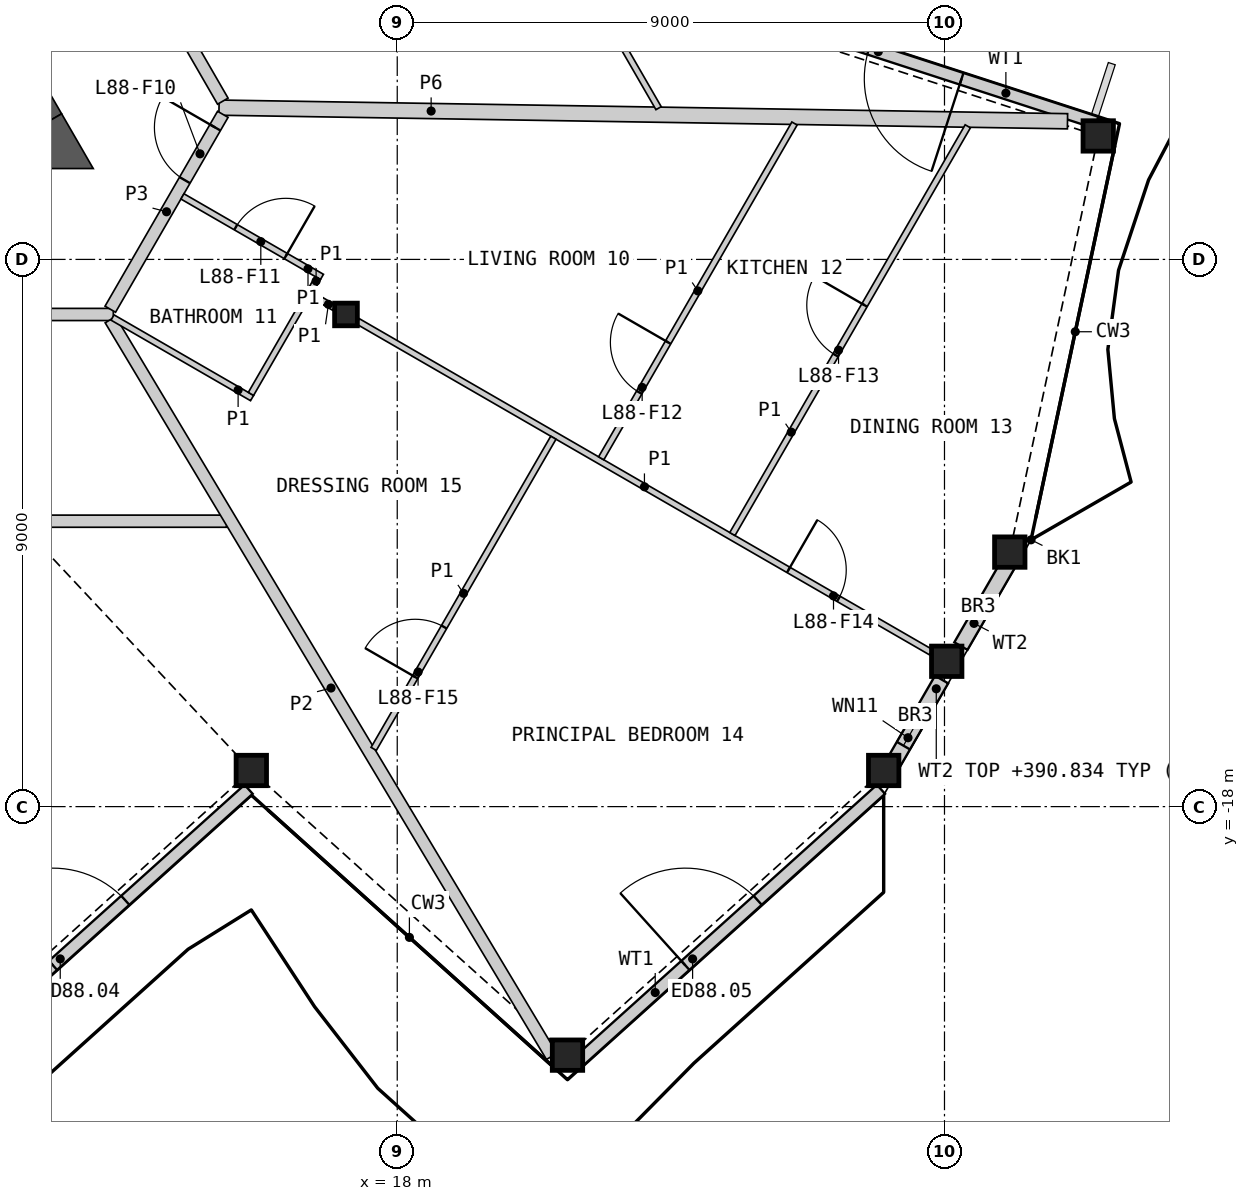
"""IFC4 building model, lengths in metres.
Left out: names, types, materials, properties, quantities, classifications, styles, units other than length and angle.
Written with IfcOpenShell. Run it as: python <this file> out.ifc"""

import sys

from ifc_helpers import new_model, si_unit, direction, frame, frame_2d, origin, origin_2d, place, context, subcontext, project, spatial, polyline, rectangle, hollow_rectangle, i_section, outline, extrude, element, fill, save


model = new_model("IFC4")
c1 = context("Model", 3, precision=1e-05, world=origin(), true_north=direction((0.0, 1.0)))
c2 = subcontext(c1, "Body", "Model", "MODEL_VIEW")
j1 = project(units=[si_unit("LENGTHUNIT", "METRE"), si_unit("PLANEANGLEUNIT", "RADIAN")], contexts=[c1])
p1 = place(None, origin())
s1 = spatial("IfcSite", under=j1, at=p1, CompositionType="ELEMENT")
p2 = place(p1, origin())
s2 = spatial("IfcBuilding", under=s1, at=p2, CompositionType="ELEMENT")
p3 = place(p2, frame((0.0, 0.0, 388.2)))
s3 = spatial("IfcBuildingStorey", under=s2, at=p3, CompositionType="ELEMENT", Elevation=388.2)
for number, where, z_axis, x_axis in (
    (1, (15.6, -17.406, 0.0), (0.0, 0.0, 1.0), (1.0, 0.0, 0.0)),
    (2, (20.8, -22.088, 0.0), (0.0, 0.0, 1.0), (1.0, 0.0, 0.0)),
    (3, (26.0, -17.406, 0.0), (0.0, 0.0, 1.0), (1.0, 0.0, 0.0)),
    (4, (27.037, -15.61, 0.0), (0.0, 0.0, 1.0), (1.0, 0.0, 0.0)),
    (5, (28.074, -13.814, 0.0), (0.0, 0.0, 1.0), (1.0, 0.0, 0.0)),
    (6, (29.529, -6.969, 0.0), (0.0, 0.0, 1.0), (1.0, 0.0, 0.0)),
):
    element("IfcColumn", number, at=place(p3, frame(where, z_axis=z_axis, x_axis=x_axis)), inside=s3, PredefinedType="COLUMN", context=c2, shape_type="SweptSolid", body=[
        extrude(hollow_rectangle(XDim=0.5, YDim=0.5, WallThickness=0.03, at=origin_2d()), origin(), (0.0, 0.0, 1.0), 3.4),
    ])
p4 = place(p3, frame((17.157, -9.906, 0.0), z_axis=(0.0, 0.0, 1.0), x_axis=(1.0, 0.0, 0.0)))
e7 = element("IfcColumn", 7, at=p4, inside=s3, PredefinedType="COLUMN", context=c2, shape_type="SweptSolid", body=[
    extrude(i_section(OverallWidth=0.374, OverallDepth=0.372, WebThickness=0.016, FlangeThickness=0.026, at=origin_2d()), origin(), (0.0, 0.0, 1.0), 3.4),
])
p5 = place(p3, frame((10.605, -22.173, 0.0), z_axis=(0.0, 0.0, 1.0), x_axis=(0.743135582201, 0.669140871915, 0.0)))
e8 = element("IfcWall", 8, at=p5, inside=s3, PredefinedType="SOLIDWALL", context=c2, shape_type="SweptSolid", body=[
    extrude(rectangle(XDim=6.662, YDim=0.2, at=frame_2d((3.331, 0.0))), origin(), (0.0, 0.0, 1.0), 2.634),
])
p6 = place(p5, frame((2.333, 0.0, 0.0)))
e9 = element("IfcOpeningElement", 9, at=p6, cuts=e8, PredefinedType="OPENING", context=c2, shape_type="SweptSolid", body=[
    extrude(rectangle(XDim=1.6, YDim=2.25, at=frame_2d((0.8, 1.125))), frame((0.0, 0.11, 0.0), z_axis=(0.0, -1.0, 0.0), x_axis=(1.0, 0.0, 0.0)), (0.0, 0.0, 1.0), 0.22),
])
p7 = place(p3, frame((21.005, -22.173, 0.0), z_axis=(0.0, 0.0, 1.0), x_axis=(0.743135582201, 0.669140871915, 0.0)))
e10 = element("IfcWall", 10, at=p7, inside=s3, PredefinedType="SOLIDWALL", context=c2, shape_type="SweptSolid", body=[
    extrude(rectangle(XDim=6.662, YDim=0.2, at=frame_2d((3.331, 0.0))), origin(), (0.0, 0.0, 1.0), 2.634),
])
p8 = place(p7, frame((2.333, 0.0, 0.0)))
e11 = element("IfcOpeningElement", 11, at=p8, cuts=e10, PredefinedType="OPENING", context=c2, shape_type="SweptSolid", body=[
    extrude(rectangle(XDim=1.6, YDim=2.25, at=frame_2d((0.8, 1.125))), frame((0.0, 0.11, 0.0), z_axis=(0.0, -1.0, 0.0), x_axis=(1.0, 0.0, 0.0)), (0.0, 0.0, 1.0), 0.22),
])
p9 = place(p3, frame((26.075, -17.43, 0.0), z_axis=(0.0, 0.0, 1.0), x_axis=(0.500027377864, 0.86600959659, 0.0)))
e12 = element("IfcWall", 12, at=p9, inside=s3, PredefinedType="SOLIDWALL", context=c2, shape_type="SweptSolid", body=[
    extrude(rectangle(XDim=1.756, YDim=0.25, at=frame_2d((0.878, 0.0))), origin(), (0.0, 0.0, 1.0), 2.634),
])
p10 = place(p9, frame((0.5, 0.0, 1.7)))
e13 = element("IfcOpeningElement", 13, at=p10, cuts=e12, PredefinedType="OPENING", context=c2, shape_type="SweptSolid", body=[
    extrude(rectangle(XDim=0.6, YDim=0.7, at=frame_2d((0.3, 0.35))), frame((0.0, 0.135, 0.0), z_axis=(0.0, -1.0, 0.0), x_axis=(1.0, 0.0, 0.0)), (0.0, 0.0, 1.0), 0.27),
])
p11 = place(p3, frame((27.27, -15.36, 0.0), z_axis=(0.0, 0.0, 1.0), x_axis=(0.499975693202, 0.866039436866, 0.0)))
e14 = element("IfcWall", 14, at=p11, inside=s3, PredefinedType="SOLIDWALL", context=c2, shape_type="SweptSolid", body=[
    extrude(rectangle(XDim=1.725, YDim=0.25, at=frame_2d((0.862, 0.0))), origin(), (0.0, 0.0, 1.0), 2.634),
])
p12 = place(p3, frame((29.5, -6.75, 0.0), z_axis=(0.0, 0.0, 1.0), x_axis=(-0.951060123915, 0.309005891041, 0.0)))
e15 = element("IfcWall", 15, at=p12, inside=s3, PredefinedType="SOLIDWALL", context=c2, shape_type="SweptSolid", body=[
    extrude(rectangle(XDim=6.265, YDim=0.2, at=frame_2d((3.133, 0.0))), origin(), (0.0, 0.0, 1.0), 2.634),
])
p13 = place(p12, frame((2.333, 0.0, 0.0)))
e16 = element("IfcOpeningElement", 16, at=p13, cuts=e15, PredefinedType="OPENING", context=c2, shape_type="SweptSolid", body=[
    extrude(rectangle(XDim=1.6, YDim=2.25, at=frame_2d((0.8, 1.125))), frame((0.0, 0.11, 0.0), z_axis=(0.0, -1.0, 0.0), x_axis=(1.0, 0.0, 0.0)), (0.0, 0.0, 1.0), 0.22),
])
p14 = place(p3, frame((12.221, -6.756, 0.0), z_axis=(0.0, 0.0, 1.0), x_axis=(-0.500020646047, 0.866013483456, 0.0)))
e17 = element("IfcWall", 17, at=p14, inside=s3, PredefinedType="SHEAR", context=c2, shape_type="SweptSolid", body=[
    extrude(rectangle(XDim=4.559, YDim=0.6, at=frame_2d((2.28, 0.0))), origin(), (0.0, 0.0, 1.0), 3.1),
])
p15 = place(p3, origin())
e18 = element("IfcWall", 18, at=p15, inside=s3, PredefinedType="SHEAR", context=c2, shape_type="SweptSolid", body=[
    extrude(outline(polyline([(11.961, -7.506), (11.961, -6.906), (12.48, -6.606), (13.0, -7.506), (11.961, -7.506)])), origin(), (0.0, 0.0, 1.0), 3.1),
])
p16 = place(p3, frame((15.069, -6.503, 0.0), z_axis=(0.0, 0.0, 1.0), x_axis=(0.999870484296, -0.016093931549, 0.0)))
e19 = element("IfcWall", 19, at=p16, inside=s3, PredefinedType="PARTITIONING", context=c2, shape_type="SweptSolid", body=[
    extrude(rectangle(XDim=13.956, YDim=0.25, at=frame_2d((6.978, 0.0))), origin(), (0.0, 0.0, 1.0), 2.33),
])
p17 = place(p3, frame((8.775, -9.906, 0.0), z_axis=(0.0, 0.0, 1.0), x_axis=(1.0, 0.0, 0.0)))
e20 = element("IfcWall", 20, at=p17, inside=s3, PredefinedType="PARTITIONING", context=c2, shape_type="SweptSolid", body=[
    extrude(rectangle(XDim=4.555, YDim=0.2, at=frame_2d((2.278, 0.0))), origin(), (0.0, 0.0, 1.0), 3.1),
])
p18 = place(p3, frame((12.981, -2.673, 0.0), z_axis=(0.0, 0.0, 1.0), x_axis=(0.499986217557, -0.866033360935, 0.0)))
e21 = element("IfcWall", 21, at=p18, inside=s3, PredefinedType="PARTITIONING", context=c2, shape_type="SweptSolid", body=[
    extrude(rectangle(XDim=4.3, YDim=0.2, at=frame_2d((2.15, 0.0))), origin(), (0.0, 0.0, 1.0), 3.1),
])
p19 = place(p3, frame((13.281, -9.819, 0.0), z_axis=(0.0, 0.0, 1.0), x_axis=(0.499948957823, 0.866054870994, 0.0)))
e22 = element("IfcWall", 22, at=p19, inside=s3, PredefinedType="PARTITIONING", context=c2, shape_type="SweptSolid", body=[
    extrude(rectangle(XDim=3.701, YDim=0.2, at=frame_2d((1.851, 0.0))), origin(), (0.0, 0.0, 1.0), 3.1),
])
p20 = place(p19, frame((2.451, 0.0, 0.0)))
e23 = element("IfcOpeningElement", 23, at=p20, cuts=e22, PredefinedType="OPENING", context=c2, shape_type="SweptSolid", body=[
    extrude(rectangle(XDim=1.0, YDim=2.1, at=frame_2d((0.5, 1.05))), frame((0.0, 0.11, 0.0), z_axis=(0.0, -1.0, 0.0), x_axis=(1.0, 0.0, 0.0)), (0.0, 0.0, 1.0), 0.22),
])
p21 = place(p3, frame((0.1, -13.306, 0.0), z_axis=(0.0, 0.0, 1.0), x_axis=(1.0, 0.0, 0.0)))
e24 = element("IfcWall", 24, at=p21, inside=s3, PredefinedType="PARTITIONING", context=c2, shape_type="SweptSolid", body=[
    extrude(rectangle(XDim=15.094, YDim=0.2, at=frame_2d((7.547, 0.0))), origin(), (0.0, 0.0, 1.0), 2.33),
])
p22 = place(p21, frame((9.781, 0.0, 0.0)))
e25 = element("IfcOpeningElement", 25, at=p22, cuts=e24, PredefinedType="OPENING", context=c2, shape_type="SweptSolid", body=[
    extrude(rectangle(XDim=0.95, YDim=2.1, at=frame_2d((0.475, 1.05))), frame((0.0, 0.11, 0.0), z_axis=(0.0, -1.0, 0.0), x_axis=(1.0, 0.0, 0.0)), (0.0, 0.0, 1.0), 0.22),
])
p23 = place(p3, frame((13.282, -9.991, 0.0), z_axis=(0.0, 0.0, 1.0), x_axis=(0.513867741763, -0.857869421285, 0.0)))
e26 = element("IfcWall", 26, at=p23, inside=s3, PredefinedType="PARTITIONING", context=c2, shape_type="SweptSolid", body=[
    extrude(rectangle(XDim=14.124, YDim=0.2, at=frame_2d((7.062, 0.0))), origin(), (0.0, 0.0, 1.0), 2.33),
])
p24 = place(p3, frame((17.354, -10.019, 0.0), z_axis=(0.0, 0.0, 1.0), x_axis=(0.866019680922, -0.500009912158, 0.0)))
e27 = element("IfcWall", 27, at=p24, inside=s3, PredefinedType="PARTITIONING", context=c2, shape_type="SweptSolid", body=[
    extrude(rectangle(XDim=10.881, YDim=0.1, at=frame_2d((5.44, 0.0))), origin(), (0.0, 0.0, 1.0), 2.33),
])
p25 = place(p24, frame((8.176, 0.0, 0.0)))
e28 = element("IfcOpeningElement", 28, at=p25, cuts=e27, PredefinedType="OPENING", context=c2, shape_type="SweptSolid", body=[
    extrude(rectangle(XDim=0.95, YDim=2.1, at=frame_2d((0.475, 1.05))), frame((0.0, 0.06, 0.0), z_axis=(0.0, -1.0, 0.0), x_axis=(1.0, 0.0, 0.0)), (0.0, 0.0, 1.0), 0.12),
])
p26 = place(p3, frame((23.512, -13.517, 0.0), z_axis=(0.0, 0.0, 1.0), x_axis=(0.49998445949, 0.866034375916, 0.0)))
e29 = element("IfcWall", 29, at=p26, inside=s3, PredefinedType="PARTITIONING", context=c2, shape_type="SweptSolid", body=[
    extrude(rectangle(XDim=7.743, YDim=0.1, at=frame_2d((3.872, 0.0))), origin(), (0.0, 0.0, 1.0), 2.33),
])
p27 = place(p26, frame((3.397, 0.0, 0.0)))
e30 = element("IfcOpeningElement", 30, at=p27, cuts=e29, PredefinedType="OPENING", context=c2, shape_type="SweptSolid", body=[
    extrude(rectangle(XDim=0.95, YDim=2.1, at=frame_2d((0.475, 1.05))), frame((0.0, 0.06, 0.0), z_axis=(0.0, -1.0, 0.0), x_axis=(1.0, 0.0, 0.0)), (0.0, 0.0, 1.0), 0.12),
])
p28 = place(p3, frame((21.354, -12.271, 0.0), z_axis=(0.0, 0.0, 1.0), x_axis=(0.499983931063, 0.866034680991, 0.0)))
e31 = element("IfcWall", 31, at=p28, inside=s3, PredefinedType="PARTITIONING", context=c2, shape_type="SweptSolid", body=[
    extrude(rectangle(XDim=6.358, YDim=0.1, at=frame_2d((3.179, 0.0))), origin(), (0.0, 0.0, 1.0), 2.33),
])
p29 = place(p28, frame((1.252, 0.0, 0.0)))
e32 = element("IfcOpeningElement", 32, at=p29, cuts=e31, PredefinedType="OPENING", context=c2, shape_type="SweptSolid", body=[
    extrude(rectangle(XDim=0.95, YDim=2.1, at=frame_2d((0.475, 1.05))), frame((0.0, 0.06, 0.0), z_axis=(0.0, -1.0, 0.0), x_axis=(1.0, 0.0, 0.0)), (0.0, 0.0, 1.0), 0.12),
])
p30 = place(p3, frame((19.128, -1.023, 0.0), z_axis=(0.0, 0.0, 1.0), x_axis=(0.499991387631, -0.866030376081, 0.0)))
e33 = element("IfcWall", 33, at=p30, inside=s3, PredefinedType="PARTITIONING", context=c2, shape_type="SweptSolid", body=[
    extrude(rectangle(XDim=6.339, YDim=0.1, at=frame_2d((3.169, 0.0))), origin(), (0.0, 0.0, 1.0), 2.33),
])
p31 = place(p30, frame((2.389, 0.0, 0.0)))
e34 = element("IfcOpeningElement", 34, at=p31, cuts=e33, PredefinedType="OPENING", context=c2, shape_type="SweptSolid", body=[
    extrude(rectangle(XDim=0.95, YDim=2.1, at=frame_2d((0.475, 1.05))), frame((0.0, 0.06, 0.0), z_axis=(0.0, -1.0, 0.0), x_axis=(1.0, 0.0, 0.0)), (0.0, 0.0, 1.0), 0.12),
])
p32 = place(p3, frame((17.613, -17.051, 0.0), z_axis=(0.0, 0.0, 1.0), x_axis=(0.499982307286, 0.866035618437, 0.0)))
e35 = element("IfcWall", 35, at=p32, inside=s3, PredefinedType="PARTITIONING", context=c2, shape_type="SweptSolid", body=[
    extrude(rectangle(XDim=5.91, YDim=0.1, at=frame_2d((2.955, 0.0))), origin(), (0.0, 0.0, 1.0), 2.33),
])
p33 = place(p32, frame((1.365, 0.0, 0.0)))
e36 = element("IfcOpeningElement", 36, at=p33, cuts=e35, PredefinedType="OPENING", context=c2, shape_type="SweptSolid", body=[
    extrude(rectangle(XDim=0.95, YDim=2.1, at=frame_2d((0.475, 1.05))), frame((0.0, 0.06, 0.0), z_axis=(0.0, -1.0, 0.0), x_axis=(1.0, 0.0, 0.0)), (0.0, 0.0, 1.0), 0.12),
])
p34 = place(p3, frame((13.317, -9.956, 0.0), z_axis=(0.0, 0.0, 1.0), x_axis=(0.866052124492, -0.499953715521, 0.0)))
e37 = element("IfcWall", 37, at=p34, inside=s3, PredefinedType="PARTITIONING", context=c2, shape_type="SweptSolid", body=[
    extrude(rectangle(XDim=2.65, YDim=0.1, at=frame_2d((1.325, 0.0))), origin(), (0.0, 0.0, 1.0), 2.33),
])
p35 = place(p3, frame((14.468, -7.964, 0.0), z_axis=(0.0, 0.0, 1.0), x_axis=(0.86603978909, -0.499975083092, 0.0)))
e38 = element("IfcWall", 38, at=p35, inside=s3, PredefinedType="PARTITIONING", context=c2, shape_type="SweptSolid", body=[
    extrude(rectangle(XDim=2.649, YDim=0.1, at=frame_2d((1.325, 0.0))), origin(), (0.0, 0.0, 1.0), 2.33),
])
p36 = place(p35, frame((1.013, 0.0, 0.0)))
e39 = element("IfcOpeningElement", 39, at=p36, cuts=e38, PredefinedType="OPENING", context=c2, shape_type="SweptSolid", body=[
    extrude(rectangle(XDim=0.95, YDim=2.1, at=frame_2d((0.475, 1.05))), frame((0.0, 0.06, 0.0), z_axis=(0.0, -1.0, 0.0), x_axis=(1.0, 0.0, 0.0)), (0.0, 0.0, 1.0), 0.12),
])
p37 = place(p3, frame((15.594, -11.212, 0.0), z_axis=(0.0, 0.0, 1.0), x_axis=(0.500011643316, 0.866018681408, 0.0)))
e40 = element("IfcWall", 40, at=p37, inside=s3, PredefinedType="PARTITIONING", context=c2, shape_type="SweptSolid", body=[
    extrude(rectangle(XDim=1.973, YDim=0.1, at=frame_2d((0.987, 0.0))), origin(), (0.0, 0.0, 1.0), 2.33),
])
p38 = place(p3, frame((16.594, -9.581, 0.0), z_axis=(0.0, 0.0, 1.0), x_axis=(0.866137484628, -0.499805820016, 0.0)))
e41 = element("IfcWall", 41, at=p38, inside=s3, PredefinedType="PARTITIONING", context=c2, shape_type="SweptSolid", body=[
    extrude(rectangle(XDim=0.423, YDim=0.1, at=frame_2d((0.211, 0.0))), origin(), (0.0, 0.0, 1.0), 2.33),
])
p39 = place(p3, frame((16.582, -9.501, 0.0), z_axis=(0.0, 0.0, 1.0), x_axis=(0.498246276801, 0.867035551551, 0.0)))
e42 = element("IfcWall", 42, at=p39, inside=s3, PredefinedType="PARTITIONING", context=c2, shape_type="SweptSolid", body=[
    extrude(rectangle(XDim=0.224, YDim=0.1, at=frame_2d((0.112, 0.0))), origin(), (0.0, 0.0, 1.0), 2.33),
])
p40 = place(p6, origin())
e43 = element("IfcDoor", 43, at=p40, inside=s3, OperationType="DOUBLE_DOOR_SINGLE_SWING", PredefinedType="DOOR", context=c2, shape_type="SweptSolid", body=[
    extrude(rectangle(XDim=1.6, YDim=2.25, at=frame_2d((0.8, 1.125))), frame((0.0, 0.025, 0.0), z_axis=(0.0, -1.0, 0.0), x_axis=(1.0, 0.0, 0.0)), (0.0, 0.0, 1.0), 0.05),
])
fill(e9, e43)
p41 = place(p8, origin())
e44 = element("IfcDoor", 44, at=p41, inside=s3, OperationType="DOUBLE_DOOR_SINGLE_SWING", PredefinedType="DOOR", context=c2, shape_type="SweptSolid", body=[
    extrude(rectangle(XDim=1.6, YDim=2.25, at=frame_2d((0.8, 1.125))), frame((0.0, 0.025, 0.0), z_axis=(0.0, -1.0, 0.0), x_axis=(1.0, 0.0, 0.0)), (0.0, 0.0, 1.0), 0.05),
])
fill(e11, e44)
p42 = place(p10, origin())
e45 = element("IfcWindow", 45, at=p42, inside=s3, PartitioningType="SINGLE_PANEL", PredefinedType="WINDOW", context=c2, shape_type="SweptSolid", body=[
    extrude(rectangle(XDim=0.6, YDim=0.7, at=frame_2d((0.3, 0.35))), frame((0.0, 0.03, 0.0), z_axis=(0.0, -1.0, 0.0), x_axis=(1.0, 0.0, 0.0)), (0.0, 0.0, 1.0), 0.06),
])
fill(e13, e45)
p43 = place(p13, origin())
e46 = element("IfcDoor", 46, at=p43, inside=s3, OperationType="DOUBLE_DOOR_SINGLE_SWING", PredefinedType="DOOR", context=c2, shape_type="SweptSolid", body=[
    extrude(rectangle(XDim=1.6, YDim=2.25, at=frame_2d((0.8, 1.125))), frame((0.0, 0.025, 0.0), z_axis=(0.0, -1.0, 0.0), x_axis=(1.0, 0.0, 0.0)), (0.0, 0.0, 1.0), 0.05),
])
fill(e16, e46)
p44 = place(p20, origin())
e47 = element("IfcDoor", 47, at=p44, inside=s3, OperationType="SINGLE_SWING_RIGHT", PredefinedType="DOOR", context=c2, shape_type="SweptSolid", body=[
    extrude(rectangle(XDim=1.0, YDim=2.1, at=frame_2d((0.5, 1.05))), frame((0.0, 0.025, 0.0), z_axis=(0.0, -1.0, 0.0), x_axis=(1.0, 0.0, 0.0)), (0.0, 0.0, 1.0), 0.05),
])
fill(e23, e47)
p45 = place(p36, origin())
e48 = element("IfcDoor", 48, at=p45, inside=s3, OperationType="SINGLE_SWING_RIGHT", PredefinedType="DOOR", context=c2, shape_type="SweptSolid", body=[
    extrude(rectangle(XDim=0.95, YDim=2.1, at=frame_2d((0.475, 1.05))), frame((0.0, 0.025, 0.0), z_axis=(0.0, -1.0, 0.0), x_axis=(1.0, 0.0, 0.0)), (0.0, 0.0, 1.0), 0.05),
])
fill(e39, e48)
p46 = place(p29, origin())
e49 = element("IfcDoor", 49, at=p46, inside=s3, OperationType="SINGLE_SWING_RIGHT", PredefinedType="DOOR", context=c2, shape_type="SweptSolid", body=[
    extrude(rectangle(XDim=0.95, YDim=2.1, at=frame_2d((0.475, 1.05))), frame((0.0, 0.025, 0.0), z_axis=(0.0, -1.0, 0.0), x_axis=(1.0, 0.0, 0.0)), (0.0, 0.0, 1.0), 0.05),
])
fill(e32, e49)
p47 = place(p27, origin())
e50 = element("IfcDoor", 50, at=p47, inside=s3, OperationType="SINGLE_SWING_RIGHT", PredefinedType="DOOR", context=c2, shape_type="SweptSolid", body=[
    extrude(rectangle(XDim=0.95, YDim=2.1, at=frame_2d((0.475, 1.05))), frame((0.0, 0.025, 0.0), z_axis=(0.0, -1.0, 0.0), x_axis=(1.0, 0.0, 0.0)), (0.0, 0.0, 1.0), 0.05),
])
fill(e30, e50)
p48 = place(p25, origin())
e51 = element("IfcDoor", 51, at=p48, inside=s3, OperationType="SINGLE_SWING_LEFT", PredefinedType="DOOR", context=c2, shape_type="SweptSolid", body=[
    extrude(rectangle(XDim=0.95, YDim=2.1, at=frame_2d((0.475, 1.05))), frame((0.0, 0.025, 0.0), z_axis=(0.0, -1.0, 0.0), x_axis=(1.0, 0.0, 0.0)), (0.0, 0.0, 1.0), 0.05),
])
fill(e28, e51)
p49 = place(p33, origin())
e52 = element("IfcDoor", 52, at=p49, inside=s3, OperationType="SINGLE_SWING_LEFT", PredefinedType="DOOR", context=c2, shape_type="SweptSolid", body=[
    extrude(rectangle(XDim=0.95, YDim=2.1, at=frame_2d((0.475, 1.05))), frame((0.0, 0.025, 0.0), z_axis=(0.0, -1.0, 0.0), x_axis=(1.0, 0.0, 0.0)), (0.0, 0.0, 1.0), 0.05),
])
fill(e36, e52)
save(model, sys.argv[1])
